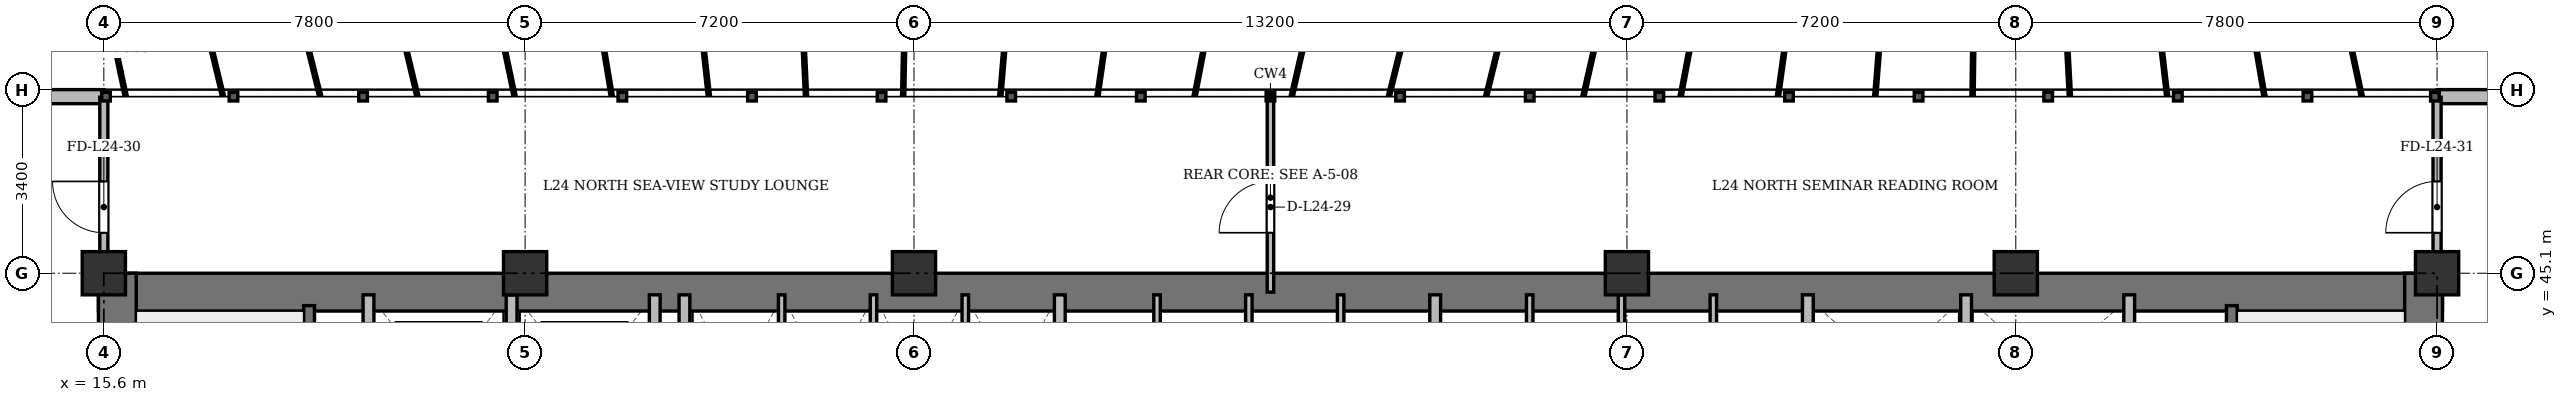
"""IFC4 building model, lengths in metres.
Left out: names, types, materials, properties, quantities, classifications, styles, units other than length and angle.
Written with IfcOpenShell. Run it as: python <this file> out.ifc"""

import sys

from ifc_helpers import new_model, si_unit, direction, frame, frame_2d, origin, origin_2d, place, context, subcontext, project, spatial, rectangle, extrude, source, transform, mapped, element, fill, save


model = new_model("IFC4")
c1 = context("Model", 3, precision=1e-05, world=origin(), true_north=direction((0.0, 1.0)))
c2 = subcontext(c1, "Body", "Model", "MODEL_VIEW")
j1 = project(units=[si_unit("LENGTHUNIT", "METRE"), si_unit("PLANEANGLEUNIT", "RADIAN")], contexts=[c1])
p1 = place(None, origin())
s1 = spatial("IfcSite", under=j1, at=p1, CompositionType="ELEMENT")
p2 = place(p1, origin())
s2 = spatial("IfcBuilding", under=s1, at=p2, CompositionType="ELEMENT")
p3 = place(p2, frame((0.0, 0.0, 96.1)))
s3 = spatial("IfcBuildingStorey", under=s2, at=p3, CompositionType="ELEMENT", Elevation=96.1)
m1 = source(origin(), c2, "Body", "SweptSolid", [
    extrude(rectangle(XDim=0.8, YDim=0.8, at=origin_2d()), origin(), (0.0, 0.0, 1.0), 3.6),
])
for number, where, z_axis, x_axis in (
    (1, (15.6, 45.1, 0.0), (0.0, 0.0, 1.0), (1.0, 0.0, 0.0)),
    (2, (23.4, 45.1, 0.0), (0.0, 0.0, 1.0), (1.0, 0.0, 0.0)),
    (3, (30.6, 45.1, 0.0), (0.0, 0.0, 1.0), (1.0, 0.0, 0.0)),
    (4, (43.8, 45.1, 0.0), (0.0, 0.0, 1.0), (1.0, 0.0, 0.0)),
    (5, (51.0, 45.1, 0.0), (0.0, 0.0, 1.0), (1.0, 0.0, 0.0)),
    (6, (58.8, 45.1, 0.0), (0.0, 0.0, 1.0), (1.0, 0.0, 0.0)),
):
    element("IfcColumn", number, at=place(p3, frame(where, z_axis=z_axis, x_axis=x_axis)), inside=s3, PredefinedType="COLUMN", context=c2, shape_type="MappedRepresentation", body=[
        mapped(m1, transform((0.0, 0.0, 0.0), x_axis=(1.0, 0.0, 0.0), y_axis=(0.0, 1.0, 0.0), z_axis=(0.0, 0.0, 1.0), scale=1.0)),
    ])
p4 = place(p3, frame((7.6, 48.37, 0.0), z_axis=(0.0, 0.0, 1.0), x_axis=(1.0, 0.0, 0.0)))
e7 = element("IfcWall", 7, at=p4, inside=s3, PredefinedType="SOLIDWALL", context=c2, shape_type="SweptSolid", body=[
    extrude(rectangle(XDim=8.0, YDim=0.26, at=frame_2d((4.0, 0.0))), origin(), (0.0, 0.0, 1.0), 3.34),
])
p5 = place(p4, frame((0.768, 0.0, 0.9)))
e8 = element("IfcOpeningElement", 8, at=p5, cuts=e7, PredefinedType="OPENING", context=c2, shape_type="SweptSolid", body=[
    extrude(rectangle(XDim=1.2, YDim=1.65, at=frame_2d((0.6, 0.825))), frame((0.0, 0.14, 0.0), z_axis=(0.0, -1.0, 0.0), x_axis=(1.0, 0.0, 0.0)), (0.0, 0.0, 1.0), 0.28),
])
p6 = place(p4, frame((4.608, 0.0, 0.9)))
e9 = element("IfcOpeningElement", 9, at=p6, cuts=e7, PredefinedType="OPENING", context=c2, shape_type="SweptSolid", body=[
    extrude(rectangle(XDim=1.2, YDim=1.65, at=frame_2d((0.6, 0.825))), frame((0.0, 0.14, 0.0), z_axis=(0.0, -1.0, 0.0), x_axis=(1.0, 0.0, 0.0)), (0.0, 0.0, 1.0), 0.28),
])
p7 = place(p3, frame((58.8, 48.37, 0.0), z_axis=(0.0, 0.0, 1.0), x_axis=(1.0, 0.0, 0.0)))
e10 = element("IfcWall", 10, at=p7, inside=s3, PredefinedType="SOLIDWALL", context=c2, shape_type="SweptSolid", body=[
    extrude(rectangle(XDim=8.0, YDim=0.26, at=frame_2d((4.0, 0.0))), origin(), (0.0, 0.0, 1.0), 3.34),
])
p8 = place(p7, frame((3.308, 0.0, 0.9)))
e11 = element("IfcOpeningElement", 11, at=p8, cuts=e10, PredefinedType="OPENING", context=c2, shape_type="SweptSolid", body=[
    extrude(rectangle(XDim=1.2, YDim=1.65, at=frame_2d((0.6, 0.825))), frame((0.0, 0.14, 0.0), z_axis=(0.0, -1.0, 0.0), x_axis=(1.0, 0.0, 0.0)), (0.0, 0.0, 1.0), 0.28),
])
p9 = place(p3, frame((15.5, 44.75, 0.0), z_axis=(0.0, 0.0, 1.0), x_axis=(1.0, 0.0, 0.0)))
e12 = element("IfcWall", 12, at=p9, inside=s3, PredefinedType="SHEAR", context=c2, shape_type="SweptSolid", body=[
    extrude(rectangle(XDim=43.4, YDim=0.7, at=frame_2d((21.7, 0.0))), origin(), (0.0, 0.0, 1.0), 3.34),
])
for number, where, z_axis, x_axis in (
    (13, (15.85, 33.4, 0.0), (0.0, 0.0, 1.0), (0.0, 1.0, 0.0)),
    (14, (58.55, 33.4, 0.0), (0.0, 0.0, 1.0), (0.0, 1.0, 0.0)),
):
    element("IfcWall", number, at=place(p3, frame(where, z_axis=z_axis, x_axis=x_axis)), inside=s3, PredefinedType="SHEAR", context=c2, shape_type="SweptSolid", body=[
        extrude(rectangle(XDim=11.7, YDim=0.7, at=frame_2d((5.85, 0.0))), origin(), (0.0, 0.0, 1.0), 3.34),
    ])
p10 = place(p3, frame((19.4, 33.4, 0.0), z_axis=(0.0, 0.0, 1.0), x_axis=(0.0, 1.0, 0.0)))
e15 = element("IfcWall", 15, at=p10, inside=s3, PredefinedType="SHEAR", context=c2, shape_type="SweptSolid", body=[
    extrude(rectangle(XDim=11.1, YDim=0.2, at=frame_2d((5.55, 0.0))), origin(), (0.0, 0.0, 1.0), 3.34),
])
p11 = place(p10, frame((0.85, 0.0, 0.0)))
e16 = element("IfcOpeningElement", 16, at=p11, cuts=e15, PredefinedType="OPENING", context=c2, shape_type="SweptSolid", body=[
    extrude(rectangle(XDim=1.1, YDim=2.15, at=frame_2d((0.55, 1.075))), frame((0.0, 0.11, 0.0), z_axis=(0.0, -1.0, 0.0), x_axis=(1.0, 0.0, 0.0)), (0.0, 0.0, 1.0), 0.22),
])
p12 = place(p3, frame((55.0, 33.4, 0.0), z_axis=(0.0, 0.0, 1.0), x_axis=(0.0, 1.0, 0.0)))
e17 = element("IfcWall", 17, at=p12, inside=s3, PredefinedType="SHEAR", context=c2, shape_type="SweptSolid", body=[
    extrude(rectangle(XDim=11.1, YDim=0.2, at=frame_2d((5.55, 0.0))), origin(), (0.0, 0.0, 1.0), 3.34),
])
p13 = place(p12, frame((0.85, 0.0, 0.0)))
e18 = element("IfcOpeningElement", 18, at=p13, cuts=e17, PredefinedType="OPENING", context=c2, shape_type="SweptSolid", body=[
    extrude(rectangle(XDim=1.1, YDim=2.15, at=frame_2d((0.55, 1.075))), frame((0.0, 0.11, 0.0), z_axis=(0.0, -1.0, 0.0), x_axis=(1.0, 0.0, 0.0)), (0.0, 0.0, 1.0), 0.22),
])
for number, where, z_axis, x_axis in (
    (19, (20.5, 41.3, 0.0), (0.0, 0.0, 1.0), (0.0, 1.0, 0.0)),
    (20, (23.15, 41.3, 0.0), (0.0, 0.0, 1.0), (0.0, 1.0, 0.0)),
    (21, (25.8, 41.3, 0.0), (0.0, 0.0, 1.0), (0.0, 1.0, 0.0)),
):
    element("IfcWall", number, at=place(p3, frame(where, z_axis=z_axis, x_axis=x_axis)), inside=s3, PredefinedType="SOLIDWALL", context=c2, shape_type="SweptSolid", body=[
        extrude(rectangle(XDim=3.4, YDim=0.2, at=frame_2d((1.7, 0.0))), origin(), (0.0, 0.0, 1.0), 3.34),
    ])
p14 = place(p3, frame((26.35, 33.4, 0.0), z_axis=(0.0, 0.0, 1.0), x_axis=(0.0, 1.0, 0.0)))
e22 = element("IfcWall", 22, at=p14, inside=s3, PredefinedType="SOLIDWALL", context=c2, shape_type="SweptSolid", body=[
    extrude(rectangle(XDim=11.3, YDim=0.2, at=frame_2d((5.65, 0.0))), origin(), (0.0, 0.0, 1.0), 2.752),
])
p15 = place(p3, frame((33.3, 41.5, 0.0), z_axis=(0.0, 0.0, 1.0), x_axis=(0.0, 1.0, 0.0)))
e23 = element("IfcWall", 23, at=p15, inside=s3, PredefinedType="SOLIDWALL", context=c2, shape_type="SweptSolid", body=[
    extrude(rectangle(XDim=3.2, YDim=0.2, at=frame_2d((1.6, 0.0))), origin(), (0.0, 0.0, 1.0), 3.34),
])
for number, where, z_axis, x_axis in (
    (24, (28.15, 41.5, 0.0), (0.0, 0.0, 1.0), (0.0, 1.0, 0.0)),
    (25, (29.85, 41.5, 0.0), (0.0, 0.0, 1.0), (0.0, 1.0, 0.0)),
    (26, (31.55, 41.5, 0.0), (0.0, 0.0, 1.0), (0.0, 1.0, 0.0)),
    (27, (35.1, 41.5, 0.0), (0.0, 0.0, 1.0), (0.0, 1.0, 0.0)),
    (28, (36.8, 41.5, 0.0), (0.0, 0.0, 1.0), (0.0, 1.0, 0.0)),
    (29, (38.5, 41.5, 0.0), (0.0, 0.0, 1.0), (0.0, 1.0, 0.0)),
):
    element("IfcWall", number, at=place(p3, frame(where, z_axis=z_axis, x_axis=x_axis)), inside=s3, PredefinedType="PARTITIONING", context=c2, shape_type="SweptSolid", body=[
        extrude(rectangle(XDim=3.2, YDim=0.12, at=frame_2d((1.6, 0.0))), origin(), (0.0, 0.0, 1.0), 3.34),
    ])
p16 = place(p3, frame((40.25, 41.5, 0.0), z_axis=(0.0, 0.0, 1.0), x_axis=(0.0, 1.0, 0.0)))
e30 = element("IfcWall", 30, at=p16, inside=s3, PredefinedType="SOLIDWALL", context=c2, shape_type="SweptSolid", body=[
    extrude(rectangle(XDim=3.2, YDim=0.2, at=frame_2d((1.6, 0.0))), origin(), (0.0, 0.0, 1.0), 3.34),
])
p17 = place(p3, frame((42.0, 41.5, 0.0), z_axis=(0.0, 0.0, 1.0), x_axis=(0.0, 1.0, 0.0)))
e31 = element("IfcWall", 31, at=p17, inside=s3, PredefinedType="PARTITIONING", context=c2, shape_type="SweptSolid", body=[
    extrude(rectangle(XDim=3.2, YDim=0.12, at=frame_2d((1.6, 0.0))), origin(), (0.0, 0.0, 1.0), 3.34),
])
p18 = place(p3, frame((43.7, 41.5, 0.0), z_axis=(0.0, 0.0, 1.0), x_axis=(0.0, 1.0, 0.0)))
e32 = element("IfcWall", 32, at=p18, inside=s3, PredefinedType="PARTITIONING", context=c2, shape_type="SweptSolid", body=[
    extrude(rectangle(XDim=3.2, YDim=0.12, at=frame_2d((1.6, 0.0))), origin(), (0.0, 0.0, 1.0), 2.84),
])
p19 = place(p3, frame((45.4, 41.5, 0.0), z_axis=(0.0, 0.0, 1.0), x_axis=(0.0, 1.0, 0.0)))
e33 = element("IfcWall", 33, at=p19, inside=s3, PredefinedType="PARTITIONING", context=c2, shape_type="SweptSolid", body=[
    extrude(rectangle(XDim=3.2, YDim=0.12, at=frame_2d((1.6, 0.0))), origin(), (0.0, 0.0, 1.0), 3.34),
])
p20 = place(p3, frame((47.15, 33.4, 0.0), z_axis=(0.0, 0.0, 1.0), x_axis=(0.0, 1.0, 0.0)))
e34 = element("IfcWall", 34, at=p20, inside=s3, PredefinedType="SOLIDWALL", context=c2, shape_type="SweptSolid", body=[
    extrude(rectangle(XDim=11.3, YDim=0.2, at=frame_2d((5.65, 0.0))), origin(), (0.0, 0.0, 1.0), 2.752),
])
for number, where, z_axis, x_axis in (
    (35, (50.08, 42.05, 0.0), (0.0, 0.0, 1.0), (0.0, 1.0, 0.0)),
    (36, (53.1, 42.05, 0.0), (0.0, 0.0, 1.0), (0.0, 1.0, 0.0)),
):
    element("IfcWall", number, at=place(p3, frame(where, z_axis=z_axis, x_axis=x_axis)), inside=s3, PredefinedType="SOLIDWALL", context=c2, shape_type="SweptSolid", body=[
        extrude(rectangle(XDim=2.65, YDim=0.2, at=frame_2d((1.325, 0.0))), origin(), (0.0, 0.0, 1.0), 3.34),
    ])
p21 = place(p3, frame((37.2, 44.75, 0.0), z_axis=(0.0, 0.0, 1.0), x_axis=(0.0, 1.0, 0.0)))
e37 = element("IfcWall", 37, at=p21, inside=s3, PredefinedType="PARTITIONING", context=c2, shape_type="SweptSolid", body=[
    extrude(rectangle(XDim=3.61, YDim=0.12, at=frame_2d((1.805, 0.0))), origin(), (0.0, 0.0, 1.0), 2.752),
])
p22 = place(p21, frame((1.1, 0.0, 0.0)))
e38 = element("IfcOpeningElement", 38, at=p22, cuts=e37, PredefinedType="OPENING", context=c2, shape_type="SweptSolid", body=[
    extrude(rectangle(XDim=0.95, YDim=2.15, at=frame_2d((0.475, 1.075))), frame((0.0, 0.07, 0.0), z_axis=(0.0, -1.0, 0.0), x_axis=(1.0, 0.0, 0.0)), (0.0, 0.0, 1.0), 0.14),
])
p23 = place(p3, frame((15.6, 44.75, 0.0), z_axis=(0.0, 0.0, 1.0), x_axis=(0.0, 1.0, 0.0)))
e39 = element("IfcWall", 39, at=p23, inside=s3, PredefinedType="PARTITIONING", context=c2, shape_type="SweptSolid", body=[
    extrude(rectangle(XDim=3.61, YDim=0.15, at=frame_2d((1.805, 0.0))), origin(), (0.0, 0.0, 1.0), 2.84),
])
p24 = place(p23, frame((1.1, 0.0, 0.0)))
e40 = element("IfcOpeningElement", 40, at=p24, cuts=e39, PredefinedType="OPENING", context=c2, shape_type="SweptSolid", body=[
    extrude(rectangle(XDim=0.95, YDim=2.15, at=frame_2d((0.475, 1.075))), frame((0.0, 0.085, 0.0), z_axis=(0.0, -1.0, 0.0), x_axis=(1.0, 0.0, 0.0)), (0.0, 0.0, 1.0), 0.17),
])
p25 = place(p3, frame((58.8, 44.75, 0.0), z_axis=(0.0, 0.0, 1.0), x_axis=(0.0, 1.0, 0.0)))
e41 = element("IfcWall", 41, at=p25, inside=s3, PredefinedType="PARTITIONING", context=c2, shape_type="SweptSolid", body=[
    extrude(rectangle(XDim=3.61, YDim=0.15, at=frame_2d((1.805, 0.0))), origin(), (0.0, 0.0, 1.0), 2.84),
])
p26 = place(p25, frame((1.1, 0.0, 0.0)))
e42 = element("IfcOpeningElement", 42, at=p26, cuts=e41, PredefinedType="OPENING", context=c2, shape_type="SweptSolid", body=[
    extrude(rectangle(XDim=0.95, YDim=2.15, at=frame_2d((0.475, 1.075))), frame((0.0, 0.085, 0.0), z_axis=(0.0, -1.0, 0.0), x_axis=(1.0, 0.0, 0.0)), (0.0, 0.0, 1.0), 0.17),
])
m2 = source(origin(), c2, "Body", "SweptSolid", [
    extrude(rectangle(XDim=0.95, YDim=2.15, at=frame_2d((0.475, 1.075))), frame((0.0, 0.025, 0.0), z_axis=(0.0, -1.0, 0.0), x_axis=(1.0, 0.0, 0.0)), (0.0, 0.0, 1.0), 0.05),
])
p27 = place(p22, origin())
e43 = element("IfcDoor", 43, at=p27, inside=s3, OperationType="SINGLE_SWING_LEFT", PredefinedType="DOOR", context=c2, shape_type="MappedRepresentation", body=[
    mapped(m2, transform((0.0, 0.0, 0.0), x_axis=(1.0, 0.0, 0.0), y_axis=(0.0, 1.0, 0.0), z_axis=(0.0, 0.0, 1.0), scale=1.0)),
])
fill(e38, e43)
p28 = place(p24, origin())
e44 = element("IfcDoor", 44, at=p28, inside=s3, OperationType="SINGLE_SWING_RIGHT", PredefinedType="DOOR", context=c2, shape_type="MappedRepresentation", body=[
    mapped(m2, transform((0.0, 0.0, 0.0), x_axis=(1.0, 0.0, 0.0), y_axis=(0.0, 1.0, 0.0), z_axis=(0.0, 0.0, 1.0), scale=1.0)),
])
fill(e40, e44)
p29 = place(p26, origin())
e45 = element("IfcDoor", 45, at=p29, inside=s3, OperationType="SINGLE_SWING_LEFT", PredefinedType="DOOR", context=c2, shape_type="MappedRepresentation", body=[
    mapped(m2, transform((0.0, 0.0, 0.0), x_axis=(1.0, 0.0, 0.0), y_axis=(0.0, 1.0, 0.0), z_axis=(0.0, 0.0, 1.0), scale=1.0)),
])
fill(e42, e45)
save(model, sys.argv[1])
